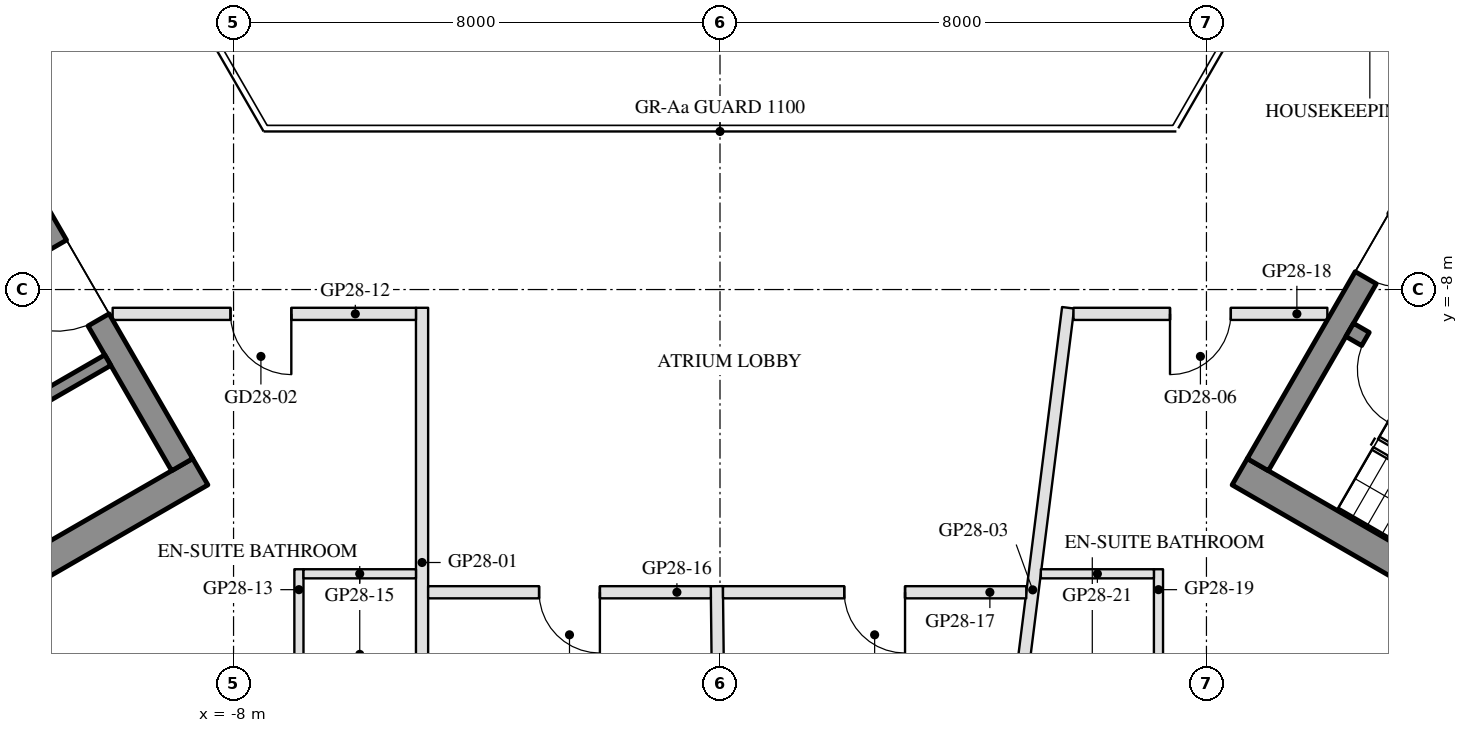
"""IFC4 building model, lengths in metres.
Left out: names, types, materials, properties, quantities, classifications, styles, units other than length and angle.
Written with IfcOpenShell. Run it as: python <this file> out.ifc"""

import sys

from ifc_helpers import new_model, si_unit, direction, frame, frame_2d, origin, place, context, subcontext, project, spatial, rectangle, extrude, element, fill, save


model = new_model("IFC4")
c1 = context("Model", 3, precision=1e-05, world=origin(), true_north=direction((0.0, 1.0)))
c2 = subcontext(c1, "Body", "Model", "MODEL_VIEW")
j1 = project(units=[si_unit("LENGTHUNIT", "METRE"), si_unit("PLANEANGLEUNIT", "RADIAN")], contexts=[c1])
p1 = place(None, origin())
s1 = spatial("IfcSite", under=j1, at=p1, CompositionType="ELEMENT")
p2 = place(p1, origin())
s2 = spatial("IfcBuilding", under=s1, at=p2, CompositionType="ELEMENT")
p3 = place(p2, frame((0.0, 0.0, 280.0)))
s3 = spatial("IfcBuildingStorey", under=s2, at=p3, CompositionType="ELEMENT", Elevation=280.0)
p4 = place(p3, frame((-8.547, -10.997, 0.0), z_axis=(0.0, 0.0, 1.0), x_axis=(-0.866024688907, -0.500001238203, 0.0)))
e1 = element("IfcWall", 1, at=p4, inside=s3, PredefinedType="SHEAR", context=c2, shape_type="SweptSolid", body=[
    extrude(rectangle(XDim=12.129, YDim=0.5, at=frame_2d((6.064, 0.0))), origin(), (0.0, 0.0, 1.0), 3.5),
])
p5 = place(p3, frame((-13.845, -2.22, 0.0), z_axis=(0.0, 0.0, 1.0), x_axis=(0.500004234368, -0.866022959057, 0.0)))
e2 = element("IfcWall", 2, at=p5, inside=s3, PredefinedType="SHEAR", context=c2, shape_type="SweptSolid", body=[
    extrude(rectangle(XDim=10.0, YDim=0.4, at=frame_2d((5.0, 0.0))), origin(), (0.0, 0.0, 1.0), 3.5),
])
p6 = place(p5, frame((3.55, 0.0, 0.0)))
e3 = element("IfcOpeningElement", 3, at=p6, cuts=e2, PredefinedType="OPENING", context=c2, shape_type="SweptSolid", body=[
    extrude(rectangle(XDim=1.1, YDim=2.1, at=frame_2d((0.55, 1.05))), frame((0.0, 0.21, 0.0), z_axis=(0.0, -1.0, 0.0), x_axis=(1.0, 0.0, 0.0)), (0.0, 0.0, 1.0), 0.42),
])
p7 = place(p5, frame((5.85, 0.0, 0.0)))
e4 = element("IfcOpeningElement", 4, at=p7, cuts=e2, PredefinedType="OPENING", context=c2, shape_type="SweptSolid", body=[
    extrude(rectangle(XDim=1.4, YDim=2.1, at=frame_2d((0.7, 1.05))), frame((0.0, 0.21, 0.0), z_axis=(0.0, -1.0, 0.0), x_axis=(1.0, 0.0, 0.0)), (0.0, 0.0, 1.0), 0.42),
])
p8 = place(p3, frame((-10.068, -9.162, 0.0), z_axis=(0.0, 0.0, 1.0), x_axis=(-0.866032725843, -0.499987317609, 0.0)))
e5 = element("IfcWall", 5, at=p8, inside=s3, PredefinedType="SHEAR", context=c2, shape_type="SweptSolid", body=[
    extrude(rectangle(XDim=10.16, YDim=0.2, at=frame_2d((5.08, 0.0))), origin(), (0.0, 0.0, 1.0), 3.5),
])
p9 = place(p8, frame((1.99, 0.0, 0.0)))
e6 = element("IfcOpeningElement", 6, at=p9, cuts=e5, PredefinedType="OPENING", context=c2, shape_type="SweptSolid", body=[
    extrude(rectangle(XDim=0.9, YDim=2.1, at=frame_2d((0.45, 1.05))), frame((0.0, 0.11, 0.0), z_axis=(0.0, -1.0, 0.0), x_axis=(1.0, 0.0, 0.0)), (0.0, 0.0, 1.0), 0.22),
])
p10 = place(p8, frame((7.07, 0.0, 0.0)))
e7 = element("IfcOpeningElement", 7, at=p10, cuts=e5, PredefinedType="OPENING", context=c2, shape_type="SweptSolid", body=[
    extrude(rectangle(XDim=0.9, YDim=2.1, at=frame_2d((0.45, 1.05))), frame((0.0, 0.11, 0.0), z_axis=(0.0, -1.0, 0.0), x_axis=(1.0, 0.0, 0.0)), (0.0, 0.0, 1.0), 0.22),
])
p11 = place(p3, frame((8.547, -10.997, 0.0), z_axis=(0.0, 0.0, 1.0), x_axis=(0.866024688907, -0.500001238203, 0.0)))
e8 = element("IfcWall", 8, at=p11, inside=s3, PredefinedType="SHEAR", context=c2, shape_type="SweptSolid", body=[
    extrude(rectangle(XDim=12.129, YDim=0.5, at=frame_2d((6.064, 0.0))), origin(), (0.0, 0.0, 1.0), 3.5),
])
p12 = place(p3, frame((8.845, -10.88, 0.0), z_axis=(0.0, 0.0, 1.0), x_axis=(0.500004234368, 0.866022959057, 0.0)))
e9 = element("IfcWall", 9, at=p12, inside=s3, PredefinedType="SHEAR", context=c2, shape_type="SweptSolid", body=[
    extrude(rectangle(XDim=10.0, YDim=0.4, at=frame_2d((5.0, 0.0))), origin(), (0.0, 0.0, 1.0), 3.5),
])
p13 = place(p12, frame((3.55, 0.0, 0.0)))
e10 = element("IfcOpeningElement", 10, at=p13, cuts=e9, PredefinedType="OPENING", context=c2, shape_type="SweptSolid", body=[
    extrude(rectangle(XDim=1.1, YDim=2.1, at=frame_2d((0.55, 1.05))), frame((0.0, 0.21, 0.0), z_axis=(0.0, -1.0, 0.0), x_axis=(1.0, 0.0, 0.0)), (0.0, 0.0, 1.0), 0.42),
])
p14 = place(p12, frame((5.85, 0.0, 0.0)))
e11 = element("IfcOpeningElement", 11, at=p14, cuts=e9, PredefinedType="OPENING", context=c2, shape_type="SweptSolid", body=[
    extrude(rectangle(XDim=1.4, YDim=2.1, at=frame_2d((0.7, 1.05))), frame((0.0, 0.21, 0.0), z_axis=(0.0, -1.0, 0.0), x_axis=(1.0, 0.0, 0.0)), (0.0, 0.0, 1.0), 0.42),
])
p15 = place(p3, frame((10.356, -8.664, 0.0), z_axis=(0.0, 0.0, 1.0), x_axis=(0.866028629588, -0.499994412703, 0.0)))
e12 = element("IfcWall", 12, at=p15, inside=s3, PredefinedType="SHEAR", context=c2, shape_type="SweptSolid", body=[
    extrude(rectangle(XDim=6.45, YDim=0.25, at=frame_2d((3.225, 0.0))), origin(), (0.0, 0.0, 1.0), 3.5),
])
p16 = place(p15, frame((0.3, 0.0, 0.0)))
e13 = element("IfcOpeningElement", 13, at=p16, cuts=e12, PredefinedType="OPENING", context=c2, shape_type="SweptSolid", body=[
    extrude(rectangle(XDim=1.0, YDim=2.1, at=frame_2d((0.5, 1.05))), frame((0.0, 0.135, 0.0), z_axis=(0.0, -1.0, 0.0), x_axis=(1.0, 0.0, 0.0)), (0.0, 0.0, 1.0), 0.27),
])
p17 = place(p3, frame((-4.9, -16.679, 0.0), z_axis=(0.0, 0.0, 1.0), x_axis=(0.0, 1.0, 0.0)))
e14 = element("IfcWall", 14, at=p17, inside=s3, PredefinedType="PARTITIONING", context=c2, shape_type="SweptSolid", body=[
    extrude(rectangle(XDim=8.379, YDim=0.2, at=frame_2d((4.189, 0.0))), origin(), (0.0, 0.0, 1.0), 3.16),
])
p18 = place(p3, frame((-0.015, -16.204, 0.0), z_axis=(0.0, 0.0, 1.0), x_axis=(-0.011013356537, 0.99993935115, 0.0)))
e15 = element("IfcWall", 15, at=p18, inside=s3, PredefinedType="PARTITIONING", context=c2, shape_type="SweptSolid", body=[
    extrude(rectangle(XDim=3.325, YDim=0.2, at=frame_2d((1.663, 0.0))), origin(), (0.0, 0.0, 1.0), 3.05),
])
p19 = place(p3, frame((4.56, -17.579, 0.0), z_axis=(0.0, 0.0, 1.0), x_axis=(0.124584174438, 0.992209042228, 0.0)))
e16 = element("IfcWall", 16, at=p19, inside=s3, PredefinedType="PARTITIONING", context=c2, shape_type="SweptSolid", body=[
    extrude(rectangle(XDim=9.351, YDim=0.2, at=frame_2d((4.676, 0.0))), origin(), (0.0, 0.0, 1.0), 3.16),
])
p20 = place(p3, frame((-5.0, -8.4, 0.0), z_axis=(0.0, 0.0, 1.0), x_axis=(-1.0, 0.0, 0.0)))
e17 = element("IfcWall", 17, at=p20, inside=s3, PredefinedType="PARTITIONING", context=c2, shape_type="SweptSolid", body=[
    extrude(rectangle(XDim=4.988, YDim=0.2, at=frame_2d((2.494, 0.0))), origin(), (0.0, 0.0, 1.0), 3.05),
])
p21 = place(p20, frame((2.05, 0.0, 0.0)))
e18 = element("IfcOpeningElement", 18, at=p21, cuts=e17, PredefinedType="OPENING", context=c2, shape_type="SweptSolid", body=[
    extrude(rectangle(XDim=1.0, YDim=2.1, at=frame_2d((0.5, 1.05))), frame((0.0, 0.11, 0.0), z_axis=(0.0, -1.0, 0.0), x_axis=(1.0, 0.0, 0.0)), (0.0, 0.0, 1.0), 0.22),
])
p22 = place(p3, frame((-6.925, -12.6, 0.0), z_axis=(0.0, 0.0, 1.0), x_axis=(0.0, -1.0, 0.0)))
e19 = element("IfcWall", 19, at=p22, inside=s3, PredefinedType="PARTITIONING", context=c2, shape_type="SweptSolid", body=[
    extrude(rectangle(XDim=2.8, YDim=0.15, at=frame_2d((1.4, 0.0))), origin(), (0.0, 0.0, 1.0), 3.55),
])
p23 = place(p22, frame((1.4, 0.0, 0.0)))
e20 = element("IfcOpeningElement", 20, at=p23, cuts=e19, PredefinedType="OPENING", context=c2, shape_type="SweptSolid", body=[
    extrude(rectangle(XDim=0.9, YDim=2.1, at=frame_2d((0.45, 1.05))), frame((0.0, 0.085, 0.0), z_axis=(0.0, -1.0, 0.0), x_axis=(1.0, 0.0, 0.0)), (0.0, 0.0, 1.0), 0.17),
])
p24 = place(p3, frame((-6.85, -12.675, 0.0), z_axis=(0.0, 0.0, 1.0), x_axis=(1.0, 0.0, 0.0)))
e21 = element("IfcWall", 21, at=p24, inside=s3, PredefinedType="PARTITIONING", context=c2, shape_type="SweptSolid", body=[
    extrude(rectangle(XDim=1.85, YDim=0.15, at=frame_2d((0.925, 0.0))), origin(), (0.0, 0.0, 1.0), 3.55),
])
p25 = place(p3, frame((-0.151, -12.979, 0.0), z_axis=(0.0, 0.0, 1.0), x_axis=(-1.0, 0.0, 0.0)))
e22 = element("IfcWall", 22, at=p25, inside=s3, PredefinedType="PARTITIONING", context=c2, shape_type="SweptSolid", body=[
    extrude(rectangle(XDim=4.649, YDim=0.2, at=frame_2d((2.325, 0.0))), origin(), (0.0, 0.0, 1.0), 3.05),
])
p26 = place(p25, frame((1.825, 0.0, 0.0)))
e23 = element("IfcOpeningElement", 23, at=p26, cuts=e22, PredefinedType="OPENING", context=c2, shape_type="SweptSolid", body=[
    extrude(rectangle(XDim=1.0, YDim=2.1, at=frame_2d((0.5, 1.05))), frame((0.0, 0.11, 0.0), z_axis=(0.0, -1.0, 0.0), x_axis=(1.0, 0.0, 0.0)), (0.0, 0.0, 1.0), 0.22),
])
p27 = place(p3, frame((5.037, -12.979, 0.0), z_axis=(0.0, 0.0, 1.0), x_axis=(-1.0, 0.0, 0.0)))
e24 = element("IfcWall", 24, at=p27, inside=s3, PredefinedType="PARTITIONING", context=c2, shape_type="SweptSolid", body=[
    extrude(rectangle(XDim=4.988, YDim=0.2, at=frame_2d((2.494, 0.0))), origin(), (0.0, 0.0, 1.0), 3.05),
])
p28 = place(p27, frame((1.994, 0.0, 0.0)))
e25 = element("IfcOpeningElement", 25, at=p28, cuts=e24, PredefinedType="OPENING", context=c2, shape_type="SweptSolid", body=[
    extrude(rectangle(XDim=1.0, YDim=2.1, at=frame_2d((0.5, 1.05))), frame((0.0, 0.11, 0.0), z_axis=(0.0, -1.0, 0.0), x_axis=(1.0, 0.0, 0.0)), (0.0, 0.0, 1.0), 0.22),
])
p29 = place(p3, frame((9.988, -8.4, 0.0), z_axis=(0.0, 0.0, 1.0), x_axis=(-1.0, 0.0, 0.0)))
e26 = element("IfcWall", 26, at=p29, inside=s3, PredefinedType="PARTITIONING", context=c2, shape_type="SweptSolid", body=[
    extrude(rectangle(XDim=4.175, YDim=0.2, at=frame_2d((2.087, 0.0))), origin(), (0.0, 0.0, 1.0), 3.05),
])
p30 = place(p29, frame((1.587, 0.0, 0.0)))
e27 = element("IfcOpeningElement", 27, at=p30, cuts=e26, PredefinedType="OPENING", context=c2, shape_type="SweptSolid", body=[
    extrude(rectangle(XDim=1.0, YDim=2.1, at=frame_2d((0.5, 1.05))), frame((0.0, 0.11, 0.0), z_axis=(0.0, -1.0, 0.0), x_axis=(1.0, 0.0, 0.0)), (0.0, 0.0, 1.0), 0.22),
])
p31 = place(p3, frame((7.211, -15.4, 0.0), z_axis=(0.0, 0.0, 1.0), x_axis=(0.0, 1.0, 0.0)))
e28 = element("IfcWall", 28, at=p31, inside=s3, PredefinedType="PARTITIONING", context=c2, shape_type="SweptSolid", body=[
    extrude(rectangle(XDim=2.8, YDim=0.15, at=frame_2d((1.4, 0.0))), origin(), (0.0, 0.0, 1.0), 3.05),
])
p32 = place(p31, frame((0.5, 0.0, 0.0)))
e29 = element("IfcOpeningElement", 29, at=p32, cuts=e28, PredefinedType="OPENING", context=c2, shape_type="SweptSolid", body=[
    extrude(rectangle(XDim=0.9, YDim=2.1, at=frame_2d((0.45, 1.05))), frame((0.0, 0.085, 0.0), z_axis=(0.0, -1.0, 0.0), x_axis=(1.0, 0.0, 0.0)), (0.0, 0.0, 1.0), 0.17),
])
p33 = place(p3, frame((5.277, -12.675, 0.0), z_axis=(0.0, 0.0, 1.0), x_axis=(1.0, 0.0, 0.0)))
e30 = element("IfcWall", 30, at=p33, inside=s3, PredefinedType="PARTITIONING", context=c2, shape_type="SweptSolid", body=[
    extrude(rectangle(XDim=1.859, YDim=0.15, at=frame_2d((0.93, 0.0))), origin(), (0.0, 0.0, 1.0), 3.05),
])
p34 = place(p3, frame((10.382, -1.182, 0.0), z_axis=(0.0, 0.0, 1.0), x_axis=(0.50002859319, -0.866008894869, 0.0)))
e31 = element("IfcWall", 31, at=p34, inside=s3, PredefinedType="PARTITIONING", context=c2, shape_type="SweptSolid", body=[
    extrude(rectangle(XDim=3.774, YDim=0.2, at=frame_2d((1.887, 0.0))), origin(), (0.0, 0.0, 1.0), 3.05),
])
p35 = place(p34, frame((1.387, 0.0, 0.0)))
e32 = element("IfcOpeningElement", 32, at=p35, cuts=e31, PredefinedType="OPENING", context=c2, shape_type="SweptSolid", body=[
    extrude(rectangle(XDim=1.0, YDim=2.1, at=frame_2d((0.5, 1.05))), frame((0.0, 0.11, 0.0), z_axis=(0.0, -1.0, 0.0), x_axis=(1.0, 0.0, 0.0)), (0.0, 0.0, 1.0), 0.22),
])
p36 = place(p3, frame((-12.269, -4.45, 0.0), z_axis=(0.0, 0.0, 1.0), x_axis=(0.500000040646, 0.866025380318, 0.0)))
e33 = element("IfcWall", 33, at=p36, inside=s3, PredefinedType="PARTITIONING", context=c2, shape_type="SweptSolid", body=[
    extrude(rectangle(XDim=3.781, YDim=0.2, at=frame_2d((1.891, 0.0))), origin(), (0.0, 0.0, 1.0), 3.05),
])
p37 = place(p36, frame((1.391, 0.0, 0.0)))
e34 = element("IfcOpeningElement", 34, at=p37, cuts=e33, PredefinedType="OPENING", context=c2, shape_type="SweptSolid", body=[
    extrude(rectangle(XDim=1.0, YDim=2.1, at=frame_2d((0.5, 1.05))), frame((0.0, 0.11, 0.0), z_axis=(0.0, -1.0, 0.0), x_axis=(1.0, 0.0, 0.0)), (0.0, 0.0, 1.0), 0.22),
])
p38 = place(p7, frame((1.4, 0.0, 0.0), z_axis=(0.0, 0.0, 1.0), x_axis=(-1.0, 0.0, 0.0)))
e35 = element("IfcDoor", 35, at=p38, inside=s3, OperationType="DOUBLE_DOOR_SINGLE_SWING", PredefinedType="DOOR", context=c2, shape_type="SweptSolid", body=[
    extrude(rectangle(XDim=1.4, YDim=2.1, at=frame_2d((0.7, 1.05))), frame((0.0, 0.025, 0.0), z_axis=(0.0, -1.0, 0.0), x_axis=(1.0, 0.0, 0.0)), (0.0, 0.0, 1.0), 0.05),
])
fill(e4, e35)
p39 = place(p13, frame((1.1, 0.0, 0.0), z_axis=(0.0, 0.0, 1.0), x_axis=(-1.0, 0.0, 0.0)))
e36 = element("IfcDoor", 36, at=p39, inside=s3, OperationType="SINGLE_SWING_LEFT", PredefinedType="DOOR", context=c2, shape_type="SweptSolid", body=[
    extrude(rectangle(XDim=1.1, YDim=2.1, at=frame_2d((0.55, 1.05))), frame((0.0, 0.025, 0.0), z_axis=(0.0, -1.0, 0.0), x_axis=(1.0, 0.0, 0.0)), (0.0, 0.0, 1.0), 0.05),
])
fill(e10, e36)
p40 = place(p16, frame((1.0, 0.0, 0.0), z_axis=(0.0, 0.0, 1.0), x_axis=(-1.0, 0.0, 0.0)))
e37 = element("IfcDoor", 37, at=p40, inside=s3, OperationType="SINGLE_SWING_LEFT", PredefinedType="DOOR", context=c2, shape_type="SweptSolid", body=[
    extrude(rectangle(XDim=1.0, YDim=2.1, at=frame_2d((0.5, 1.05))), frame((0.0, 0.025, 0.0), z_axis=(0.0, -1.0, 0.0), x_axis=(1.0, 0.0, 0.0)), (0.0, 0.0, 1.0), 0.05),
])
fill(e13, e37)
p41 = place(p21, origin())
e38 = element("IfcDoor", 38, at=p41, inside=s3, OperationType="SINGLE_SWING_LEFT", PredefinedType="DOOR", context=c2, shape_type="SweptSolid", body=[
    extrude(rectangle(XDim=1.0, YDim=2.1, at=frame_2d((0.5, 1.05))), frame((0.0, 0.025, 0.0), z_axis=(0.0, -1.0, 0.0), x_axis=(1.0, 0.0, 0.0)), (0.0, 0.0, 1.0), 0.05),
])
fill(e18, e38)
p42 = place(p26, origin())
e39 = element("IfcDoor", 39, at=p42, inside=s3, OperationType="SINGLE_SWING_LEFT", PredefinedType="DOOR", context=c2, shape_type="SweptSolid", body=[
    extrude(rectangle(XDim=1.0, YDim=2.1, at=frame_2d((0.5, 1.05))), frame((0.0, 0.025, 0.0), z_axis=(0.0, -1.0, 0.0), x_axis=(1.0, 0.0, 0.0)), (0.0, 0.0, 1.0), 0.05),
])
fill(e23, e39)
p43 = place(p28, origin())
e40 = element("IfcDoor", 40, at=p43, inside=s3, OperationType="SINGLE_SWING_LEFT", PredefinedType="DOOR", context=c2, shape_type="SweptSolid", body=[
    extrude(rectangle(XDim=1.0, YDim=2.1, at=frame_2d((0.5, 1.05))), frame((0.0, 0.025, 0.0), z_axis=(0.0, -1.0, 0.0), x_axis=(1.0, 0.0, 0.0)), (0.0, 0.0, 1.0), 0.05),
])
fill(e25, e40)
p44 = place(p30, origin())
e41 = element("IfcDoor", 41, at=p44, inside=s3, OperationType="SINGLE_SWING_RIGHT", PredefinedType="DOOR", context=c2, shape_type="SweptSolid", body=[
    extrude(rectangle(XDim=1.0, YDim=2.1, at=frame_2d((0.5, 1.05))), frame((0.0, 0.025, 0.0), z_axis=(0.0, -1.0, 0.0), x_axis=(1.0, 0.0, 0.0)), (0.0, 0.0, 1.0), 0.05),
])
fill(e27, e41)
save(model, sys.argv[1])
